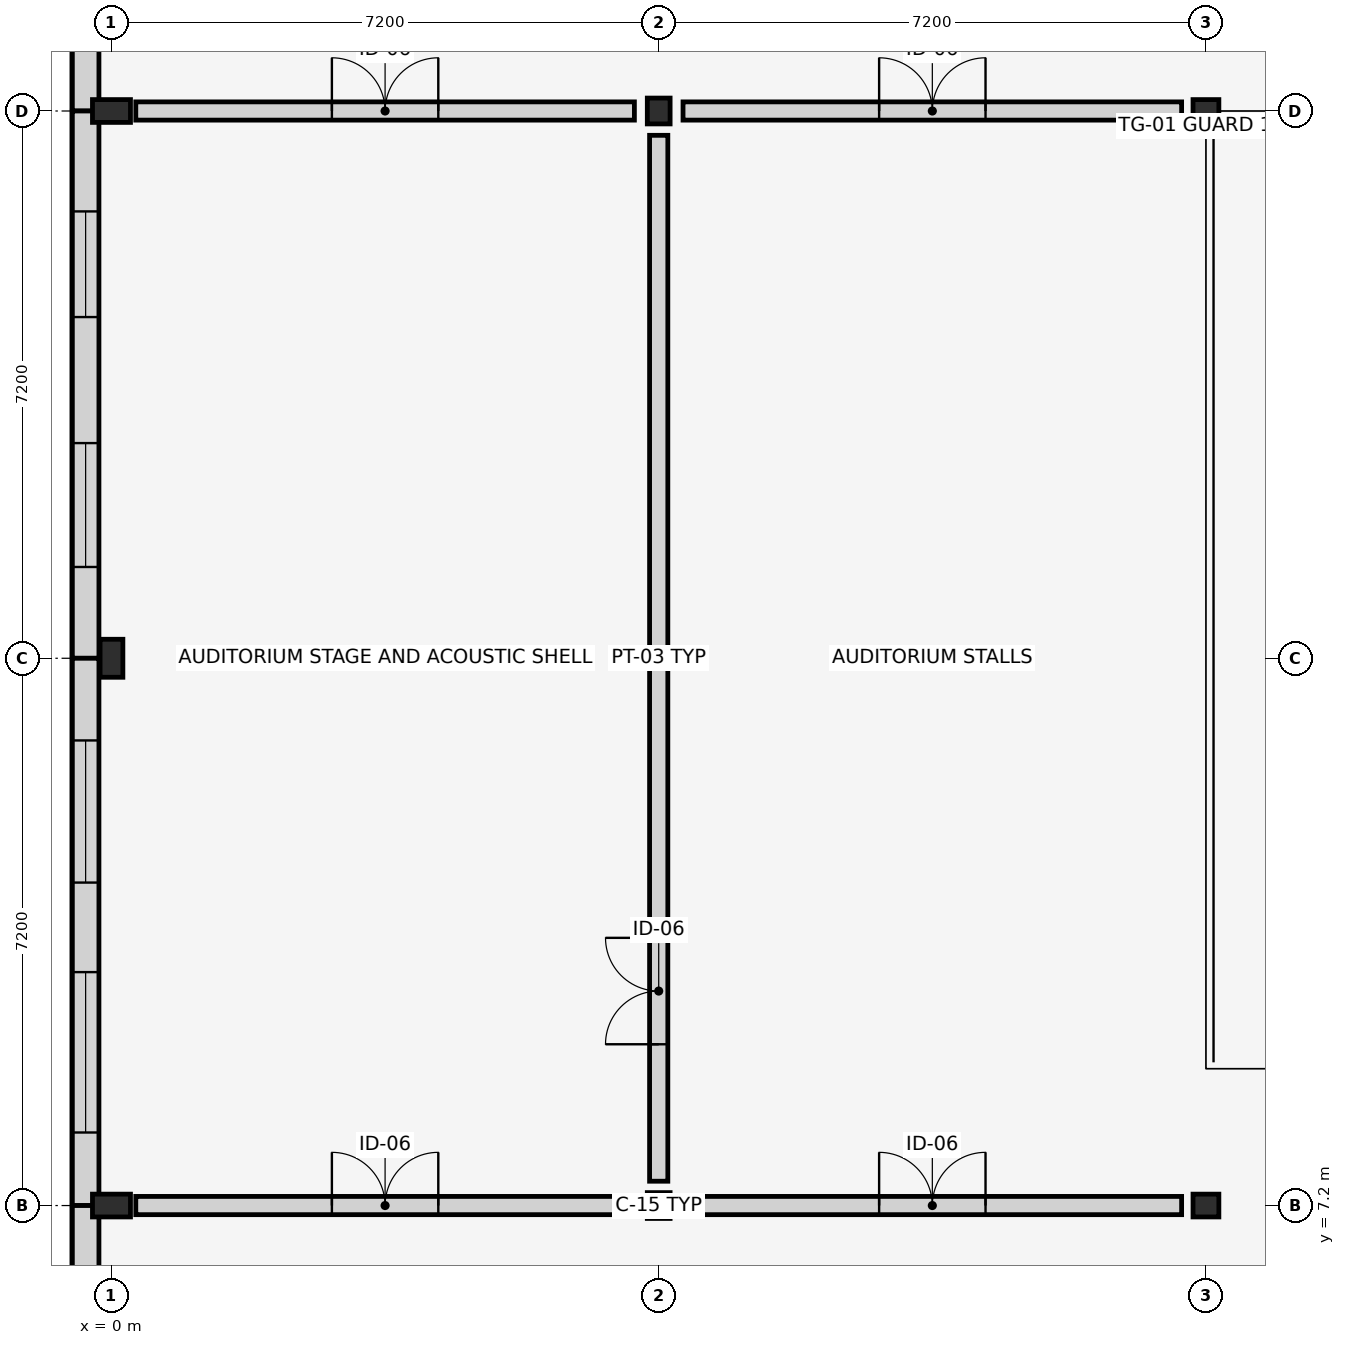
"""IFC4 building model, lengths in metres.
Left out: names, types, materials, properties, quantities, classifications, styles, units other than length and angle.
Written with IfcOpenShell. Run it as: python <this file> out.ifc"""

import sys

from ifc_helpers import new_model, si_unit, direction, frame, frame_2d, origin, origin_2d, place, context, subcontext, project, spatial, rectangle, i_section, extrude, element, fill, save


model = new_model("IFC4")
c1 = context("Model", 3, precision=1e-05, world=origin(), true_north=direction((0.0, 1.0)))
c2 = subcontext(c1, "Body", "Model", "MODEL_VIEW")
j1 = project(units=[si_unit("LENGTHUNIT", "METRE"), si_unit("PLANEANGLEUNIT", "RADIAN")], contexts=[c1])
p1 = place(None, origin())
s1 = spatial("IfcSite", under=j1, at=p1, CompositionType="ELEMENT")
p2 = place(p1, origin())
s2 = spatial("IfcBuilding", under=s1, at=p2, CompositionType="ELEMENT")
p3 = place(p2, origin())
s3 = spatial("IfcBuildingStorey", under=s2, at=p3, CompositionType="ELEMENT", Elevation=0.0)
for number, where, z_axis, x_axis in (
    (1, (0.0, 7.2, 0.0), (0.0, 0.0, 1.0), (0.0, 1.0, 0.0)),
    (2, (0.0, 14.4, 0.0), (0.0, 0.0, 1.0), (1.0, 0.0, 0.0)),
    (3, (0.0, 21.6, 0.0), (0.0, 0.0, 1.0), (0.0, 1.0, 0.0)),
):
    element("IfcColumn", number, at=place(p3, frame(where, z_axis=z_axis, x_axis=x_axis)), inside=s3, PredefinedType="COLUMN", context=c2, shape_type="SweptSolid", body=[
        extrude(i_section(OverallWidth=0.3, OverallDepth=0.5, WebThickness=0.014, FlangeThickness=0.028, FilletRadius=0.027, at=origin_2d()), origin(), (0.0, 0.0, 1.0), 4.5),
    ])
for number, where, z_axis, x_axis in (
    (4, (7.2, 7.2, 0.0), (0.0, 0.0, 1.0), (1.0, 0.0, 0.0)),
    (5, (7.2, 21.6, 0.0), (0.0, 0.0, 1.0), (1.0, 0.0, 0.0)),
    (6, (14.4, 7.2, 0.0), (0.0, 0.0, 1.0), (0.0, 1.0, 0.0)),
    (7, (14.4, 21.6, 0.0), (0.0, 0.0, 1.0), (0.0, 1.0, 0.0)),
):
    element("IfcColumn", number, at=place(p3, frame(where, z_axis=z_axis, x_axis=x_axis)), inside=s3, PredefinedType="COLUMN", context=c2, shape_type="SweptSolid", body=[
        extrude(i_section(OverallWidth=0.3, OverallDepth=0.34, WebThickness=0.012, FlangeThickness=0.021, FilletRadius=0.027, at=origin_2d()), origin(), (0.0, 0.0, 1.0), 4.5),
    ])
p4 = place(p3, frame((-0.34, 29.315, 0.0), z_axis=(0.0, 0.0, 1.0), x_axis=(0.0, -1.0, 0.0)))
e8 = element("IfcWall", 8, at=p4, inside=s3, PredefinedType="STANDARD", context=c2, shape_type="SweptSolid", body=[
    extrude(rectangle(XDim=7.715, YDim=0.35, at=frame_2d((3.857, 0.0))), origin(), (0.0, 0.0, 1.0), 4.5),
])
p5 = place(p4, frame((1.561, 0.0, 0.9)))
e9 = element("IfcOpeningElement", 9, at=p5, cuts=e8, PredefinedType="OPENING", context=c2, shape_type="SweptSolid", body=[
    extrude(rectangle(XDim=0.91, YDim=1.68, at=frame_2d((0.455, 0.84))), frame((0.0, 0.185, 0.0), z_axis=(0.0, -1.0, 0.0), x_axis=(1.0, 0.0, 0.0)), (0.0, 0.0, 1.0), 0.37),
])
p6 = place(p4, frame((4.609, 0.0, 0.9)))
e10 = element("IfcOpeningElement", 10, at=p6, cuts=e8, PredefinedType="OPENING", context=c2, shape_type="SweptSolid", body=[
    extrude(rectangle(XDim=1.15, YDim=1.68, at=frame_2d((0.575, 0.84))), frame((0.0, 0.185, 0.0), z_axis=(0.0, -1.0, 0.0), x_axis=(1.0, 0.0, 0.0)), (0.0, 0.0, 1.0), 0.37),
])
p7 = place(p3, frame((-0.34, 21.6, 0.0), z_axis=(0.0, 0.0, 1.0), x_axis=(0.0, -1.0, 0.0)))
e11 = element("IfcWall", 11, at=p7, inside=s3, PredefinedType="STANDARD", context=c2, shape_type="SweptSolid", body=[
    extrude(rectangle(XDim=7.2, YDim=0.35, at=frame_2d((3.6, 0.0))), origin(), (0.0, 0.0, 1.0), 4.5),
])
p8 = place(p7, frame((1.321, 0.0, 0.9)))
e12 = element("IfcOpeningElement", 12, at=p8, cuts=e11, PredefinedType="OPENING", context=c2, shape_type="SweptSolid", body=[
    extrude(rectangle(XDim=1.39, YDim=1.68, at=frame_2d((0.695, 0.84))), frame((0.0, 0.185, 0.0), z_axis=(0.0, -1.0, 0.0), x_axis=(1.0, 0.0, 0.0)), (0.0, 0.0, 1.0), 0.37),
])
p9 = place(p7, frame((4.369, 0.0, 0.9)))
e13 = element("IfcOpeningElement", 13, at=p9, cuts=e11, PredefinedType="OPENING", context=c2, shape_type="SweptSolid", body=[
    extrude(rectangle(XDim=1.63, YDim=1.68, at=frame_2d((0.815, 0.84))), frame((0.0, 0.185, 0.0), z_axis=(0.0, -1.0, 0.0), x_axis=(1.0, 0.0, 0.0)), (0.0, 0.0, 1.0), 0.37),
])
p10 = place(p3, frame((-0.34, 14.4, 0.0), z_axis=(0.0, 0.0, 1.0), x_axis=(0.0, -1.0, 0.0)))
e14 = element("IfcWall", 14, at=p10, inside=s3, PredefinedType="STANDARD", context=c2, shape_type="SweptSolid", body=[
    extrude(rectangle(XDim=7.2, YDim=0.35, at=frame_2d((3.6, 0.0))), origin(), (0.0, 0.0, 1.0), 4.5),
])
p11 = place(p10, frame((1.081, 0.0, 0.9)))
e15 = element("IfcOpeningElement", 15, at=p11, cuts=e14, PredefinedType="OPENING", context=c2, shape_type="SweptSolid", body=[
    extrude(rectangle(XDim=1.87, YDim=1.68, at=frame_2d((0.935, 0.84))), frame((0.0, 0.185, 0.0), z_axis=(0.0, -1.0, 0.0), x_axis=(1.0, 0.0, 0.0)), (0.0, 0.0, 1.0), 0.37),
])
p12 = place(p10, frame((4.129, 0.0, 0.9)))
e16 = element("IfcOpeningElement", 16, at=p12, cuts=e14, PredefinedType="OPENING", context=c2, shape_type="SweptSolid", body=[
    extrude(rectangle(XDim=2.11, YDim=1.68, at=frame_2d((1.055, 0.84))), frame((0.0, 0.185, 0.0), z_axis=(0.0, -1.0, 0.0), x_axis=(1.0, 0.0, 0.0)), (0.0, 0.0, 1.0), 0.37),
])
p13 = place(p3, frame((-0.34, 7.2, 0.0), z_axis=(0.0, 0.0, 1.0), x_axis=(0.0, -1.0, 0.0)))
e17 = element("IfcWall", 17, at=p13, inside=s3, PredefinedType="STANDARD", context=c2, shape_type="SweptSolid", body=[
    extrude(rectangle(XDim=7.715, YDim=0.35, at=frame_2d((3.857, 0.0))), origin(), (0.0, 0.0, 1.0), 4.5),
])
p14 = place(p13, frame((1.546, 0.0, 0.9)))
e18 = element("IfcOpeningElement", 18, at=p14, cuts=e17, PredefinedType="OPENING", context=c2, shape_type="SweptSolid", body=[
    extrude(rectangle(XDim=0.94, YDim=1.82, at=frame_2d((0.47, 0.91))), frame((0.0, 0.185, 0.0), z_axis=(0.0, -1.0, 0.0), x_axis=(1.0, 0.0, 0.0)), (0.0, 0.0, 1.0), 0.37),
])
p15 = place(p13, frame((4.594, 0.0, 0.9)))
e19 = element("IfcOpeningElement", 19, at=p15, cuts=e17, PredefinedType="OPENING", context=c2, shape_type="SweptSolid", body=[
    extrude(rectangle(XDim=1.18, YDim=1.82, at=frame_2d((0.59, 0.91))), frame((0.0, 0.185, 0.0), z_axis=(0.0, -1.0, 0.0), x_axis=(1.0, 0.0, 0.0)), (0.0, 0.0, 1.0), 0.37),
])
p16 = place(p3, frame((7.2, 7.52, 0.0), z_axis=(0.0, 0.0, 1.0), x_axis=(0.0, 1.0, 0.0)))
e20 = element("IfcWall", 20, at=p16, inside=s3, PredefinedType="PARTITIONING", context=c2, shape_type="SweptSolid", body=[
    extrude(rectangle(XDim=13.76, YDim=0.24, at=frame_2d((6.88, 0.0))), origin(), (0.0, 0.0, 1.0), 3.45),
])
p17 = place(p16, frame((1.802, 0.0, 0.0)))
e21 = element("IfcOpeningElement", 21, at=p17, cuts=e20, PredefinedType="OPENING", context=c2, shape_type="SweptSolid", body=[
    extrude(rectangle(XDim=1.4, YDim=2.3, at=frame_2d((0.7, 1.15))), frame((0.0, 0.13, 0.0), z_axis=(0.0, -1.0, 0.0), x_axis=(1.0, 0.0, 0.0)), (0.0, 0.0, 1.0), 0.26),
])
p18 = place(p3, frame((7.52, 7.2, 0.0), z_axis=(0.0, 0.0, 1.0), x_axis=(1.0, 0.0, 0.0)))
e22 = element("IfcWall", 22, at=p18, inside=s3, PredefinedType="PARTITIONING", context=c2, shape_type="SweptSolid", body=[
    extrude(rectangle(XDim=6.56, YDim=0.24, at=frame_2d((3.28, 0.0))), origin(), (0.0, 0.0, 1.0), 3.45),
])
p19 = place(p18, frame((2.58, 0.0, 0.0)))
e23 = element("IfcOpeningElement", 23, at=p19, cuts=e22, PredefinedType="OPENING", context=c2, shape_type="SweptSolid", body=[
    extrude(rectangle(XDim=1.4, YDim=2.3, at=frame_2d((0.7, 1.15))), frame((0.0, 0.13, 0.0), z_axis=(0.0, -1.0, 0.0), x_axis=(1.0, 0.0, 0.0)), (0.0, 0.0, 1.0), 0.26),
])
p20 = place(p3, frame((7.52, 21.6, 0.0), z_axis=(0.0, 0.0, 1.0), x_axis=(1.0, 0.0, 0.0)))
e24 = element("IfcWall", 24, at=p20, inside=s3, PredefinedType="PARTITIONING", context=c2, shape_type="SweptSolid", body=[
    extrude(rectangle(XDim=6.56, YDim=0.24, at=frame_2d((3.28, 0.0))), origin(), (0.0, 0.0, 1.0), 3.45),
])
p21 = place(p20, frame((2.58, 0.0, 0.0)))
e25 = element("IfcOpeningElement", 25, at=p21, cuts=e24, PredefinedType="OPENING", context=c2, shape_type="SweptSolid", body=[
    extrude(rectangle(XDim=1.4, YDim=2.3, at=frame_2d((0.7, 1.15))), frame((0.0, 0.13, 0.0), z_axis=(0.0, -1.0, 0.0), x_axis=(1.0, 0.0, 0.0)), (0.0, 0.0, 1.0), 0.26),
])
p22 = place(p3, frame((0.32, 7.2, 0.0), z_axis=(0.0, 0.0, 1.0), x_axis=(1.0, 0.0, 0.0)))
e26 = element("IfcWall", 26, at=p22, inside=s3, PredefinedType="PARTITIONING", context=c2, shape_type="SweptSolid", body=[
    extrude(rectangle(XDim=6.56, YDim=0.24, at=frame_2d((3.28, 0.0))), origin(), (0.0, 0.0, 1.0), 3.45),
])
p23 = place(p22, frame((2.58, 0.0, 0.0)))
e27 = element("IfcOpeningElement", 27, at=p23, cuts=e26, PredefinedType="OPENING", context=c2, shape_type="SweptSolid", body=[
    extrude(rectangle(XDim=1.4, YDim=2.3, at=frame_2d((0.7, 1.15))), frame((0.0, 0.13, 0.0), z_axis=(0.0, -1.0, 0.0), x_axis=(1.0, 0.0, 0.0)), (0.0, 0.0, 1.0), 0.26),
])
p24 = place(p3, frame((0.32, 21.6, 0.0), z_axis=(0.0, 0.0, 1.0), x_axis=(1.0, 0.0, 0.0)))
e28 = element("IfcWall", 28, at=p24, inside=s3, PredefinedType="PARTITIONING", context=c2, shape_type="SweptSolid", body=[
    extrude(rectangle(XDim=6.56, YDim=0.24, at=frame_2d((3.28, 0.0))), origin(), (0.0, 0.0, 1.0), 3.45),
])
p25 = place(p24, frame((2.58, 0.0, 0.0)))
e29 = element("IfcOpeningElement", 29, at=p25, cuts=e28, PredefinedType="OPENING", context=c2, shape_type="SweptSolid", body=[
    extrude(rectangle(XDim=1.4, YDim=2.3, at=frame_2d((0.7, 1.15))), frame((0.0, 0.13, 0.0), z_axis=(0.0, -1.0, 0.0), x_axis=(1.0, 0.0, 0.0)), (0.0, 0.0, 1.0), 0.26),
])
p26 = place(p8, origin())
e30 = element("IfcWindow", 30, at=p26, inside=s3, PartitioningType="SINGLE_PANEL", PredefinedType="WINDOW", context=c2, shape_type="SweptSolid", body=[
    extrude(rectangle(XDim=1.39, YDim=1.68, at=frame_2d((0.695, 0.84))), frame((0.0, 0.03, 0.0), z_axis=(0.0, -1.0, 0.0), x_axis=(1.0, 0.0, 0.0)), (0.0, 0.0, 1.0), 0.06),
])
fill(e12, e30)
p27 = place(p9, origin())
e31 = element("IfcWindow", 31, at=p27, inside=s3, PartitioningType="SINGLE_PANEL", PredefinedType="WINDOW", context=c2, shape_type="SweptSolid", body=[
    extrude(rectangle(XDim=1.63, YDim=1.68, at=frame_2d((0.815, 0.84))), frame((0.0, 0.03, 0.0), z_axis=(0.0, -1.0, 0.0), x_axis=(1.0, 0.0, 0.0)), (0.0, 0.0, 1.0), 0.06),
])
fill(e13, e31)
p28 = place(p11, origin())
e32 = element("IfcWindow", 32, at=p28, inside=s3, PartitioningType="SINGLE_PANEL", PredefinedType="WINDOW", context=c2, shape_type="SweptSolid", body=[
    extrude(rectangle(XDim=1.87, YDim=1.68, at=frame_2d((0.935, 0.84))), frame((0.0, 0.03, 0.0), z_axis=(0.0, -1.0, 0.0), x_axis=(1.0, 0.0, 0.0)), (0.0, 0.0, 1.0), 0.06),
])
fill(e15, e32)
p29 = place(p12, origin())
e33 = element("IfcWindow", 33, at=p29, inside=s3, PartitioningType="SINGLE_PANEL", PredefinedType="WINDOW", context=c2, shape_type="SweptSolid", body=[
    extrude(rectangle(XDim=2.11, YDim=1.68, at=frame_2d((1.055, 0.84))), frame((0.0, 0.03, 0.0), z_axis=(0.0, -1.0, 0.0), x_axis=(1.0, 0.0, 0.0)), (0.0, 0.0, 1.0), 0.06),
])
fill(e16, e33)
p30 = place(p17, origin())
e34 = element("IfcDoor", 34, at=p30, inside=s3, OperationType="DOUBLE_DOOR_SINGLE_SWING", PredefinedType="DOOR", context=c2, shape_type="SweptSolid", body=[
    extrude(rectangle(XDim=1.4, YDim=2.3, at=frame_2d((0.7, 1.15))), frame((0.0, 0.025, 0.0), z_axis=(0.0, -1.0, 0.0), x_axis=(1.0, 0.0, 0.0)), (0.0, 0.0, 1.0), 0.05),
])
fill(e21, e34)
p31 = place(p19, origin())
e35 = element("IfcDoor", 35, at=p31, inside=s3, OperationType="DOUBLE_DOOR_SINGLE_SWING", PredefinedType="DOOR", context=c2, shape_type="SweptSolid", body=[
    extrude(rectangle(XDim=1.4, YDim=2.3, at=frame_2d((0.7, 1.15))), frame((0.0, 0.025, 0.0), z_axis=(0.0, -1.0, 0.0), x_axis=(1.0, 0.0, 0.0)), (0.0, 0.0, 1.0), 0.05),
])
fill(e23, e35)
p32 = place(p21, origin())
e36 = element("IfcDoor", 36, at=p32, inside=s3, OperationType="DOUBLE_DOOR_SINGLE_SWING", PredefinedType="DOOR", context=c2, shape_type="SweptSolid", body=[
    extrude(rectangle(XDim=1.4, YDim=2.3, at=frame_2d((0.7, 1.15))), frame((0.0, 0.025, 0.0), z_axis=(0.0, -1.0, 0.0), x_axis=(1.0, 0.0, 0.0)), (0.0, 0.0, 1.0), 0.05),
])
fill(e25, e36)
p33 = place(p23, origin())
e37 = element("IfcDoor", 37, at=p33, inside=s3, OperationType="DOUBLE_DOOR_SINGLE_SWING", PredefinedType="DOOR", context=c2, shape_type="SweptSolid", body=[
    extrude(rectangle(XDim=1.4, YDim=2.3, at=frame_2d((0.7, 1.15))), frame((0.0, 0.025, 0.0), z_axis=(0.0, -1.0, 0.0), x_axis=(1.0, 0.0, 0.0)), (0.0, 0.0, 1.0), 0.05),
])
fill(e27, e37)
p34 = place(p25, origin())
e38 = element("IfcDoor", 38, at=p34, inside=s3, OperationType="DOUBLE_DOOR_SINGLE_SWING", PredefinedType="DOOR", context=c2, shape_type="SweptSolid", body=[
    extrude(rectangle(XDim=1.4, YDim=2.3, at=frame_2d((0.7, 1.15))), frame((0.0, 0.025, 0.0), z_axis=(0.0, -1.0, 0.0), x_axis=(1.0, 0.0, 0.0)), (0.0, 0.0, 1.0), 0.05),
])
fill(e29, e38)
save(model, sys.argv[1])
